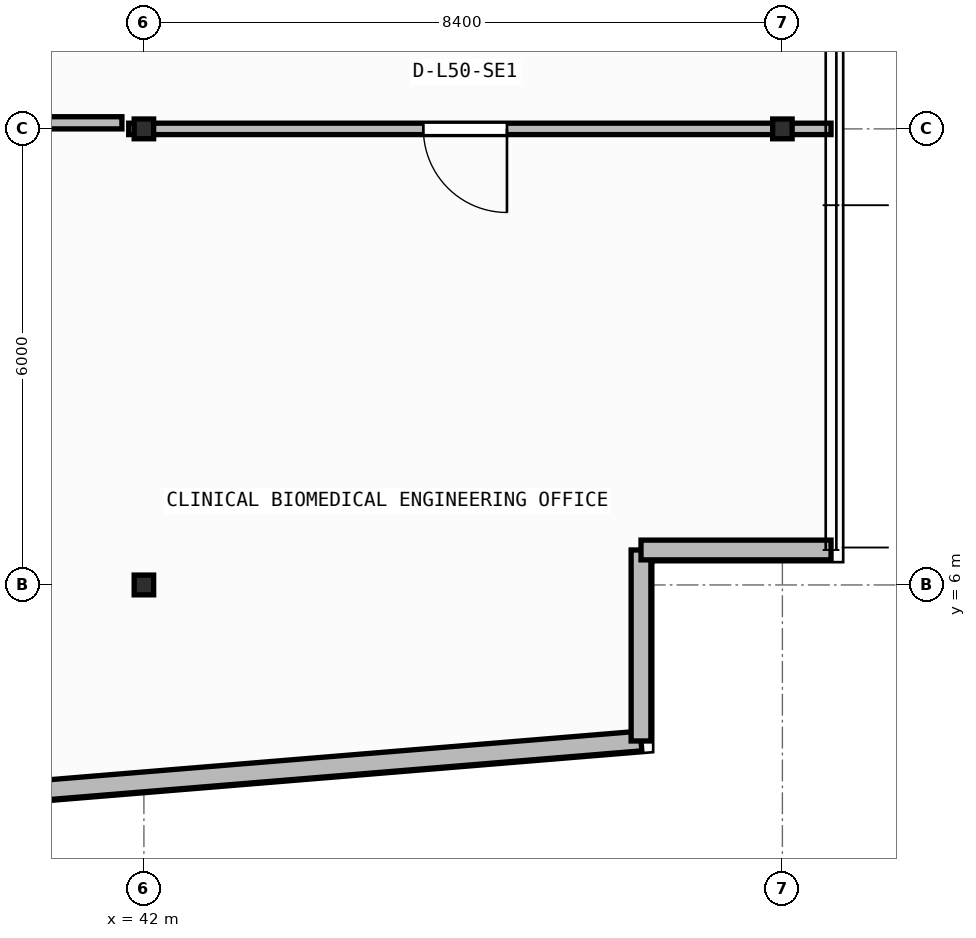
"""IFC4 building model, lengths in metres.
Left out: names, types, materials, properties, quantities, classifications, styles, units other than length and angle.
Written with IfcOpenShell. Run it as: python <this file> out.ifc"""

import sys

from ifc_helpers import new_model, si_unit, direction, frame, frame_2d, origin, origin_2d, place, context, subcontext, project, spatial, rectangle, i_section, extrude, element, fill, save


model = new_model("IFC4")
c1 = context("Model", 3, precision=1e-05, world=origin(), true_north=direction((0.0, 1.0)))
c2 = subcontext(c1, "Body", "Model", "MODEL_VIEW")
j1 = project(units=[si_unit("LENGTHUNIT", "METRE"), si_unit("PLANEANGLEUNIT", "RADIAN")], contexts=[c1])
p1 = place(None, origin())
s1 = spatial("IfcSite", under=j1, at=p1, CompositionType="ELEMENT")
p2 = place(p1, origin())
s2 = spatial("IfcBuilding", under=s1, at=p2, CompositionType="ELEMENT")
p3 = place(p2, frame((0.0, 0.0, 203.95)))
s3 = spatial("IfcBuildingStorey", under=s2, at=p3, CompositionType="ELEMENT", Elevation=203.95)
for number, where, z_axis, x_axis in (
    (1, (42.0, 6.0, 0.0), (0.0, 0.0, 1.0), (1.0, 0.0, 0.0)),
    (2, (42.0, 12.0, 0.0), (0.0, 0.0, 1.0), (1.0, 0.0, 0.0)),
    (3, (50.4, 12.0, 0.0), (0.0, 0.0, 1.0), (1.0, 0.0, 0.0)),
):
    element("IfcColumn", number, at=place(p3, frame(where, z_axis=z_axis, x_axis=x_axis)), inside=s3, PredefinedType="COLUMN", context=c2, shape_type="SweptSolid", body=[
        extrude(i_section(OverallWidth=0.256, OverallDepth=0.26, WebThickness=0.01, FlangeThickness=0.017, FilletRadius=0.013, at=origin_2d()), origin(), (0.0, 0.0, 1.0), 3.95),
    ])
p4 = place(p3, frame((2.66, 0.174, 0.0), z_axis=(0.0, 0.0, 1.0), x_axis=(0.996634028439, 0.081979347142, 0.0)))
e4 = element("IfcWall", 4, at=p4, inside=s3, PredefinedType="STANDARD", context=c2, shape_type="SweptSolid", body=[
    extrude(rectangle(XDim=46.035, YDim=0.26, at=frame_2d((23.018, 0.0))), origin(), (0.0, 0.0, 1.0), 3.71),
])
p5 = place(p4, frame((21.817, 0.0, 0.9)))
e5 = element("IfcOpeningElement", 5, at=p5, cuts=e4, PredefinedType="OPENING", context=c2, shape_type="SweptSolid", body=[
    extrude(rectangle(XDim=2.4, YDim=1.65, at=frame_2d((1.2, 0.825))), frame((0.0, 0.14, 0.0), z_axis=(0.0, -1.0, 0.0), x_axis=(1.0, 0.0, 0.0)), (0.0, 0.0, 1.0), 0.28),
])
p6 = place(p3, frame((48.54, 3.948, 0.0), z_axis=(0.0, 0.0, 1.0), x_axis=(0.0, 1.0, 0.0)))
e6 = element("IfcWall", 6, at=p6, inside=s3, PredefinedType="STANDARD", context=c2, shape_type="SweptSolid", body=[
    extrude(rectangle(XDim=2.512, YDim=0.26, at=frame_2d((1.256, 0.0))), origin(), (0.0, 0.0, 1.0), 3.71),
])
p7 = place(p3, frame((48.54, 6.46, 0.0), z_axis=(0.0, 0.0, 1.0), x_axis=(1.0, 0.0, 0.0)))
e7 = element("IfcWall", 7, at=p7, inside=s3, PredefinedType="STANDARD", context=c2, shape_type="SweptSolid", body=[
    extrude(rectangle(XDim=2.5, YDim=0.26, at=frame_2d((1.25, 0.0))), origin(), (0.0, 0.0, 1.0), 3.71),
])
p8 = place(p3, frame((51.04, 12.0, 0.0), z_axis=(0.0, 0.0, 1.0), x_axis=(-1.0, 0.0, 0.0)))
e8 = element("IfcWall", 8, at=p8, inside=s3, PredefinedType="PARTITIONING", context=c2, shape_type="SweptSolid", body=[
    extrude(rectangle(XDim=9.24, YDim=0.15, at=frame_2d((4.62, 0.0))), origin(), (0.0, 0.0, 1.0), 3.152),
])
p9 = place(p8, frame((4.263, 0.0, 0.0)))
e9 = element("IfcOpeningElement", 9, at=p9, cuts=e8, PredefinedType="OPENING", context=c2, shape_type="SweptSolid", body=[
    extrude(rectangle(XDim=1.1, YDim=2.1, at=frame_2d((0.55, 1.05))), frame((0.0, 0.085, 0.0), z_axis=(0.0, -1.0, 0.0), x_axis=(1.0, 0.0, 0.0)), (0.0, 0.0, 1.0), 0.17),
])
p10 = place(p3, frame((39.839, 12.08, 0.0), z_axis=(0.0, 0.0, 1.0), x_axis=(1.0, 0.0, 0.0)))
e10 = element("IfcWall", 10, at=p10, inside=s3, PredefinedType="PARTITIONING", context=c2, shape_type="SweptSolid", body=[
    extrude(rectangle(XDim=1.871, YDim=0.16, at=frame_2d((0.936, 0.0))), origin(), (0.0, 0.0, 1.0), 3.152),
])
p11 = place(p9, origin())
e11 = element("IfcDoor", 11, at=p11, inside=s3, OperationType="SINGLE_SWING_LEFT", PredefinedType="DOOR", context=c2, shape_type="SweptSolid", body=[
    extrude(rectangle(XDim=1.1, YDim=2.1, at=frame_2d((0.55, 1.05))), frame((0.0, 0.025, 0.0), z_axis=(0.0, -1.0, 0.0), x_axis=(1.0, 0.0, 0.0)), (0.0, 0.0, 1.0), 0.05),
])
fill(e9, e11)
save(model, sys.argv[1])
